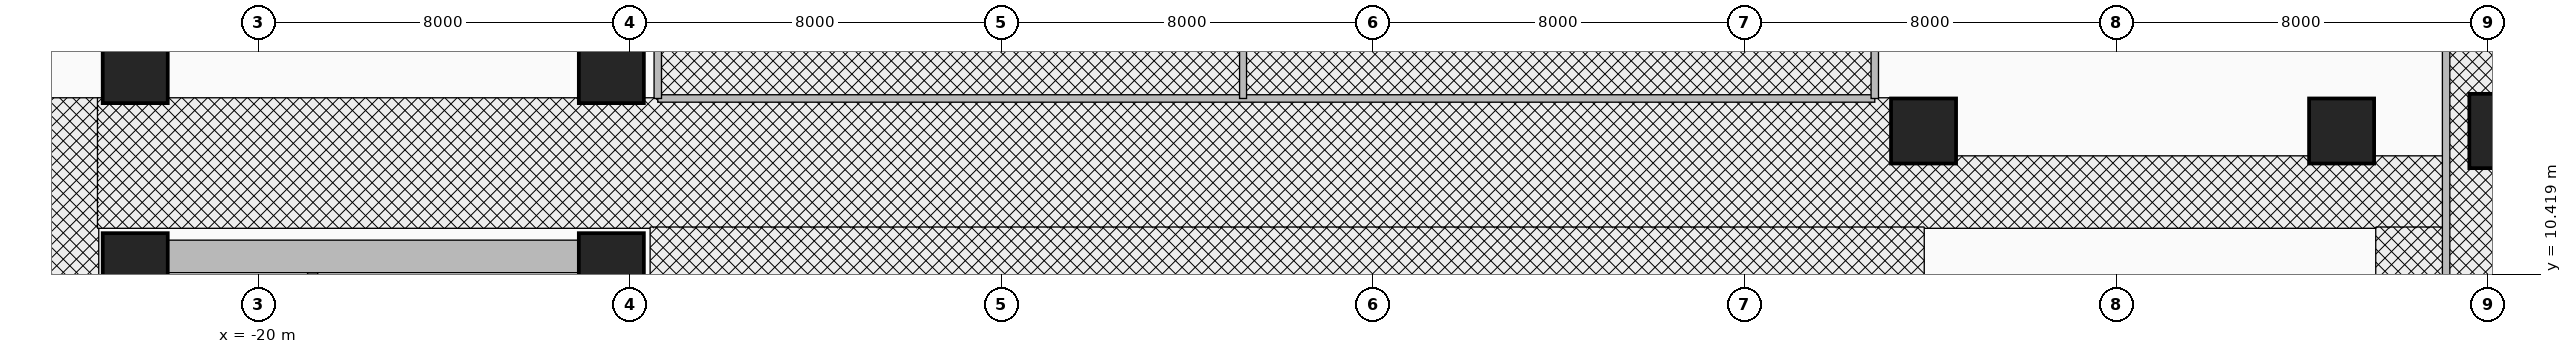
"""IFC4 building model, lengths in metres.
Left out: names, types, materials, properties, quantities, classifications, styles, units other than length and angle.
Written with IfcOpenShell. Run it as: python <this file> out.ifc"""

import sys

from ifc_helpers import new_model, si_unit, direction, frame, frame_2d, origin, origin_2d, place, context, subcontext, project, spatial, rectangle, extrude, source, transform, mapped, element, fill, save


model = new_model("IFC4")
c1 = context("Model", 3, precision=1e-05, world=origin(), true_north=direction((0.0, 1.0)))
c2 = subcontext(c1, "Body", "Model", "MODEL_VIEW")
j1 = project(units=[si_unit("LENGTHUNIT", "METRE"), si_unit("PLANEANGLEUNIT", "RADIAN")], contexts=[c1])
p1 = place(None, origin())
s1 = spatial("IfcSite", under=j1, at=p1, CompositionType="ELEMENT")
p2 = place(p1, origin())
s2 = spatial("IfcBuilding", under=s1, at=p2, CompositionType="ELEMENT")
p3 = place(p2, frame((0.0, 0.0, 15.6)))
s3 = spatial("IfcBuildingStorey", under=s2, at=p3, CompositionType="ELEMENT", Elevation=15.6)
for number, where, z_axis, x_axis in (
    (1, (-22.16, 1.78, 0.0), (0.0, 0.0, 1.0), (0.0, 1.0, 0.0)),
    (2, (-18.83, 1.78, 0.0), (0.0, 0.0, 1.0), (0.0, 1.0, 0.0)),
):
    element("IfcWall", number, at=place(p3, frame(where, z_axis=z_axis, x_axis=x_axis)), inside=s3, PredefinedType="SHEAR", context=c2, shape_type="SweptSolid", body=[
        extrude(rectangle(XDim=8.67, YDim=0.22, at=frame_2d((4.335, 0.0))), origin(), (0.0, 0.0, 1.0), 4.8),
    ])
p4 = place(p3, frame((-22.65, -11.15, 0.0), z_axis=(0.0, 0.0, 1.0), x_axis=(0.0, 1.0, 0.0)))
e3 = element("IfcWall", 3, at=p4, inside=s3, PredefinedType="SHEAR", context=c2, shape_type="SweptSolid", body=[
    extrude(rectangle(XDim=22.3, YDim=0.7, at=frame_2d((11.15, 0.0))), origin(), (0.0, 0.0, 1.0), 4.8),
])
p5 = place(p3, frame((-22.65, 10.8, 0.0), z_axis=(0.0, 0.0, 1.0), x_axis=(1.0, 0.0, 0.0)))
e4 = element("IfcWall", 4, at=p5, inside=s3, PredefinedType="SHEAR", context=c2, shape_type="SweptSolid", body=[
    extrude(rectangle(XDim=10.25, YDim=0.7, at=frame_2d((5.125, 0.0))), origin(), (0.0, 0.0, 1.0), 4.8),
])
m1 = source(origin(), c2, "Body", "SweptSolid", [
    extrude(rectangle(XDim=1.4, YDim=1.4, at=origin_2d()), origin(), (0.0, 0.0, 1.0), 5.2),
])
for number, where, z_axis, x_axis in (
    (5, (-22.65, 10.6, 0.0), (0.0, 0.0, 1.0), (1.0, 0.0, 0.0)),
    (6, (-12.4, 10.6, 0.0), (0.0, 0.0, 1.0), (1.0, 0.0, 0.0)),
    (7, (-22.65, 14.8, 0.0), (0.0, 0.0, 1.0), (1.0, 0.0, 0.0)),
    (8, (-12.4, 14.8, 0.0), (0.0, 0.0, 1.0), (1.0, 0.0, 0.0)),
    (9, (15.85, 13.5, 0.0), (0.0, 0.0, 1.0), (1.0, 0.0, 0.0)),
    (10, (24.85, 13.5, 0.0), (0.0, 0.0, 1.0), (1.0, 0.0, 0.0)),
):
    element("IfcColumn", number, at=place(p3, frame(where, z_axis=z_axis, x_axis=x_axis)), inside=s3, PredefinedType="COLUMN", context=c2, shape_type="MappedRepresentation", body=[
        mapped(m1, transform((0.0, 0.0, 0.0), x_axis=(1.0, 0.0, 0.0), y_axis=(0.0, 1.0, 0.0), z_axis=(0.0, 0.0, 1.0), scale=1.0)),
    ])
m2 = source(origin(), c2, "Body", "SweptSolid", [
    extrude(rectangle(XDim=1.6, YDim=1.6, at=origin_2d()), origin(), (0.0, 0.0, 1.0), 5.2),
])
p6 = place(p3, frame((28.4, 13.5, 0.0), z_axis=(0.0, 0.0, 1.0), x_axis=(1.0, 0.0, 0.0)))
e11 = element("IfcColumn", 11, at=p6, inside=s3, PredefinedType="COLUMN", context=c2, shape_type="MappedRepresentation", body=[
    mapped(m2, transform((0.0, 0.0, 0.0), x_axis=(1.0, 0.0, 0.0), y_axis=(0.0, 1.0, 0.0), z_axis=(0.0, 0.0, 1.0), scale=1.0)),
])
p7 = place(p3, frame((-11.4, 14.2, 0.0), z_axis=(0.0, 0.0, 1.0), x_axis=(1.0, 0.0, 0.0)))
e12 = element("IfcWall", 12, at=p7, inside=s3, PredefinedType="PARTITIONING", context=c2, shape_type="SweptSolid", body=[
    extrude(rectangle(XDim=26.2, YDim=0.16, at=frame_2d((13.1, 0.0))), origin(), (0.0, 0.0, 1.0), 3.285),
])
p8 = place(p7, frame((4.5, 0.0, 0.0)))
e13 = element("IfcOpeningElement", 13, at=p8, cuts=e12, PredefinedType="OPENING", context=c2, shape_type="SweptSolid", body=[
    extrude(rectangle(XDim=1.8, YDim=2.15, at=frame_2d((0.9, 1.075))), frame((0.0, 0.095, 0.0), z_axis=(0.0, -1.0, 0.0), x_axis=(1.0, 0.0, 0.0)), (0.0, 0.0, 1.0), 0.19),
])
p9 = place(p7, frame((17.5, 0.0, 0.0)))
e14 = element("IfcOpeningElement", 14, at=p9, cuts=e12, PredefinedType="OPENING", context=c2, shape_type="SweptSolid", body=[
    extrude(rectangle(XDim=1.8, YDim=2.15, at=frame_2d((0.9, 1.075))), frame((0.0, 0.095, 0.0), z_axis=(0.0, -1.0, 0.0), x_axis=(1.0, 0.0, 0.0)), (0.0, 0.0, 1.0), 0.19),
])
p10 = place(p3, frame((-11.4, 14.2, 0.0), z_axis=(0.0, 0.0, 1.0), x_axis=(0.0, 1.0, 0.0)))
e15 = element("IfcWall", 15, at=p10, inside=s3, PredefinedType="PARTITIONING", context=c2, shape_type="SweptSolid", body=[
    extrude(rectangle(XDim=8.54, YDim=0.16, at=frame_2d((4.27, 0.0))), origin(), (0.0, 0.0, 1.0), 3.285),
])
p11 = place(p3, frame((14.8, 14.2, 0.0), z_axis=(0.0, 0.0, 1.0), x_axis=(0.0, 1.0, 0.0)))
e16 = element("IfcWall", 16, at=p11, inside=s3, PredefinedType="PARTITIONING", context=c2, shape_type="SweptSolid", body=[
    extrude(rectangle(XDim=8.54, YDim=0.16, at=frame_2d((4.27, 0.0))), origin(), (0.0, 0.0, 1.0), 3.837),
])
p12 = place(p3, frame((1.2, 14.2, 0.0), z_axis=(0.0, 0.0, 1.0), x_axis=(0.0, 1.0, 0.0)))
e17 = element("IfcWall", 17, at=p12, inside=s3, PredefinedType="PARTITIONING", context=c2, shape_type="SweptSolid", body=[
    extrude(rectangle(XDim=8.54, YDim=0.15, at=frame_2d((4.27, 0.0))), origin(), (0.0, 0.0, 1.0), 3.285),
])
p13 = place(p3, frame((27.1, -22.74, 0.0), z_axis=(0.0, 0.0, 1.0), x_axis=(0.0, 1.0, 0.0)))
e18 = element("IfcWall", 18, at=p13, inside=s3, PredefinedType="PARTITIONING", context=c2, shape_type="SweptSolid", body=[
    extrude(rectangle(XDim=45.48, YDim=0.16, at=frame_2d((22.74, 0.0))), origin(), (0.0, 0.0, 1.0), 3.585),
])
p14 = place(p13, frame((7.0, 0.0, 0.0)))
e19 = element("IfcOpeningElement", 19, at=p14, cuts=e18, PredefinedType="OPENING", context=c2, shape_type="SweptSolid", body=[
    extrude(rectangle(XDim=1.8, YDim=2.15, at=frame_2d((0.9, 1.075))), frame((0.0, 0.095, 0.0), z_axis=(0.0, -1.0, 0.0), x_axis=(1.0, 0.0, 0.0)), (0.0, 0.0, 1.0), 0.19),
])
p15 = place(p13, frame((25.0, 0.0, 0.0)))
e20 = element("IfcOpeningElement", 20, at=p15, cuts=e18, PredefinedType="OPENING", context=c2, shape_type="SweptSolid", body=[
    extrude(rectangle(XDim=1.8, YDim=2.15, at=frame_2d((0.9, 1.075))), frame((0.0, 0.095, 0.0), z_axis=(0.0, -1.0, 0.0), x_axis=(1.0, 0.0, 0.0)), (0.0, 0.0, 1.0), 0.19),
])
p16 = place(p8, frame((1.8, 0.0, 0.0), z_axis=(0.0, 0.0, 1.0), x_axis=(-1.0, 0.0, 0.0)))
e21 = element("IfcDoor", 21, at=p16, inside=s3, OperationType="DOUBLE_DOOR_SINGLE_SWING", PredefinedType="DOOR", context=c2, shape_type="SweptSolid", body=[
    extrude(rectangle(XDim=1.8, YDim=2.15, at=frame_2d((0.9, 1.075))), frame((0.0, 0.025, 0.0), z_axis=(0.0, -1.0, 0.0), x_axis=(1.0, 0.0, 0.0)), (0.0, 0.0, 1.0), 0.05),
])
fill(e13, e21)
p17 = place(p9, origin())
e22 = element("IfcDoor", 22, at=p17, inside=s3, OperationType="DOUBLE_DOOR_SINGLE_SWING", PredefinedType="DOOR", context=c2, shape_type="SweptSolid", body=[
    extrude(rectangle(XDim=1.8, YDim=2.15, at=frame_2d((0.9, 1.075))), frame((0.0, 0.025, 0.0), z_axis=(0.0, -1.0, 0.0), x_axis=(1.0, 0.0, 0.0)), (0.0, 0.0, 1.0), 0.05),
])
fill(e14, e22)
save(model, sys.argv[1])
